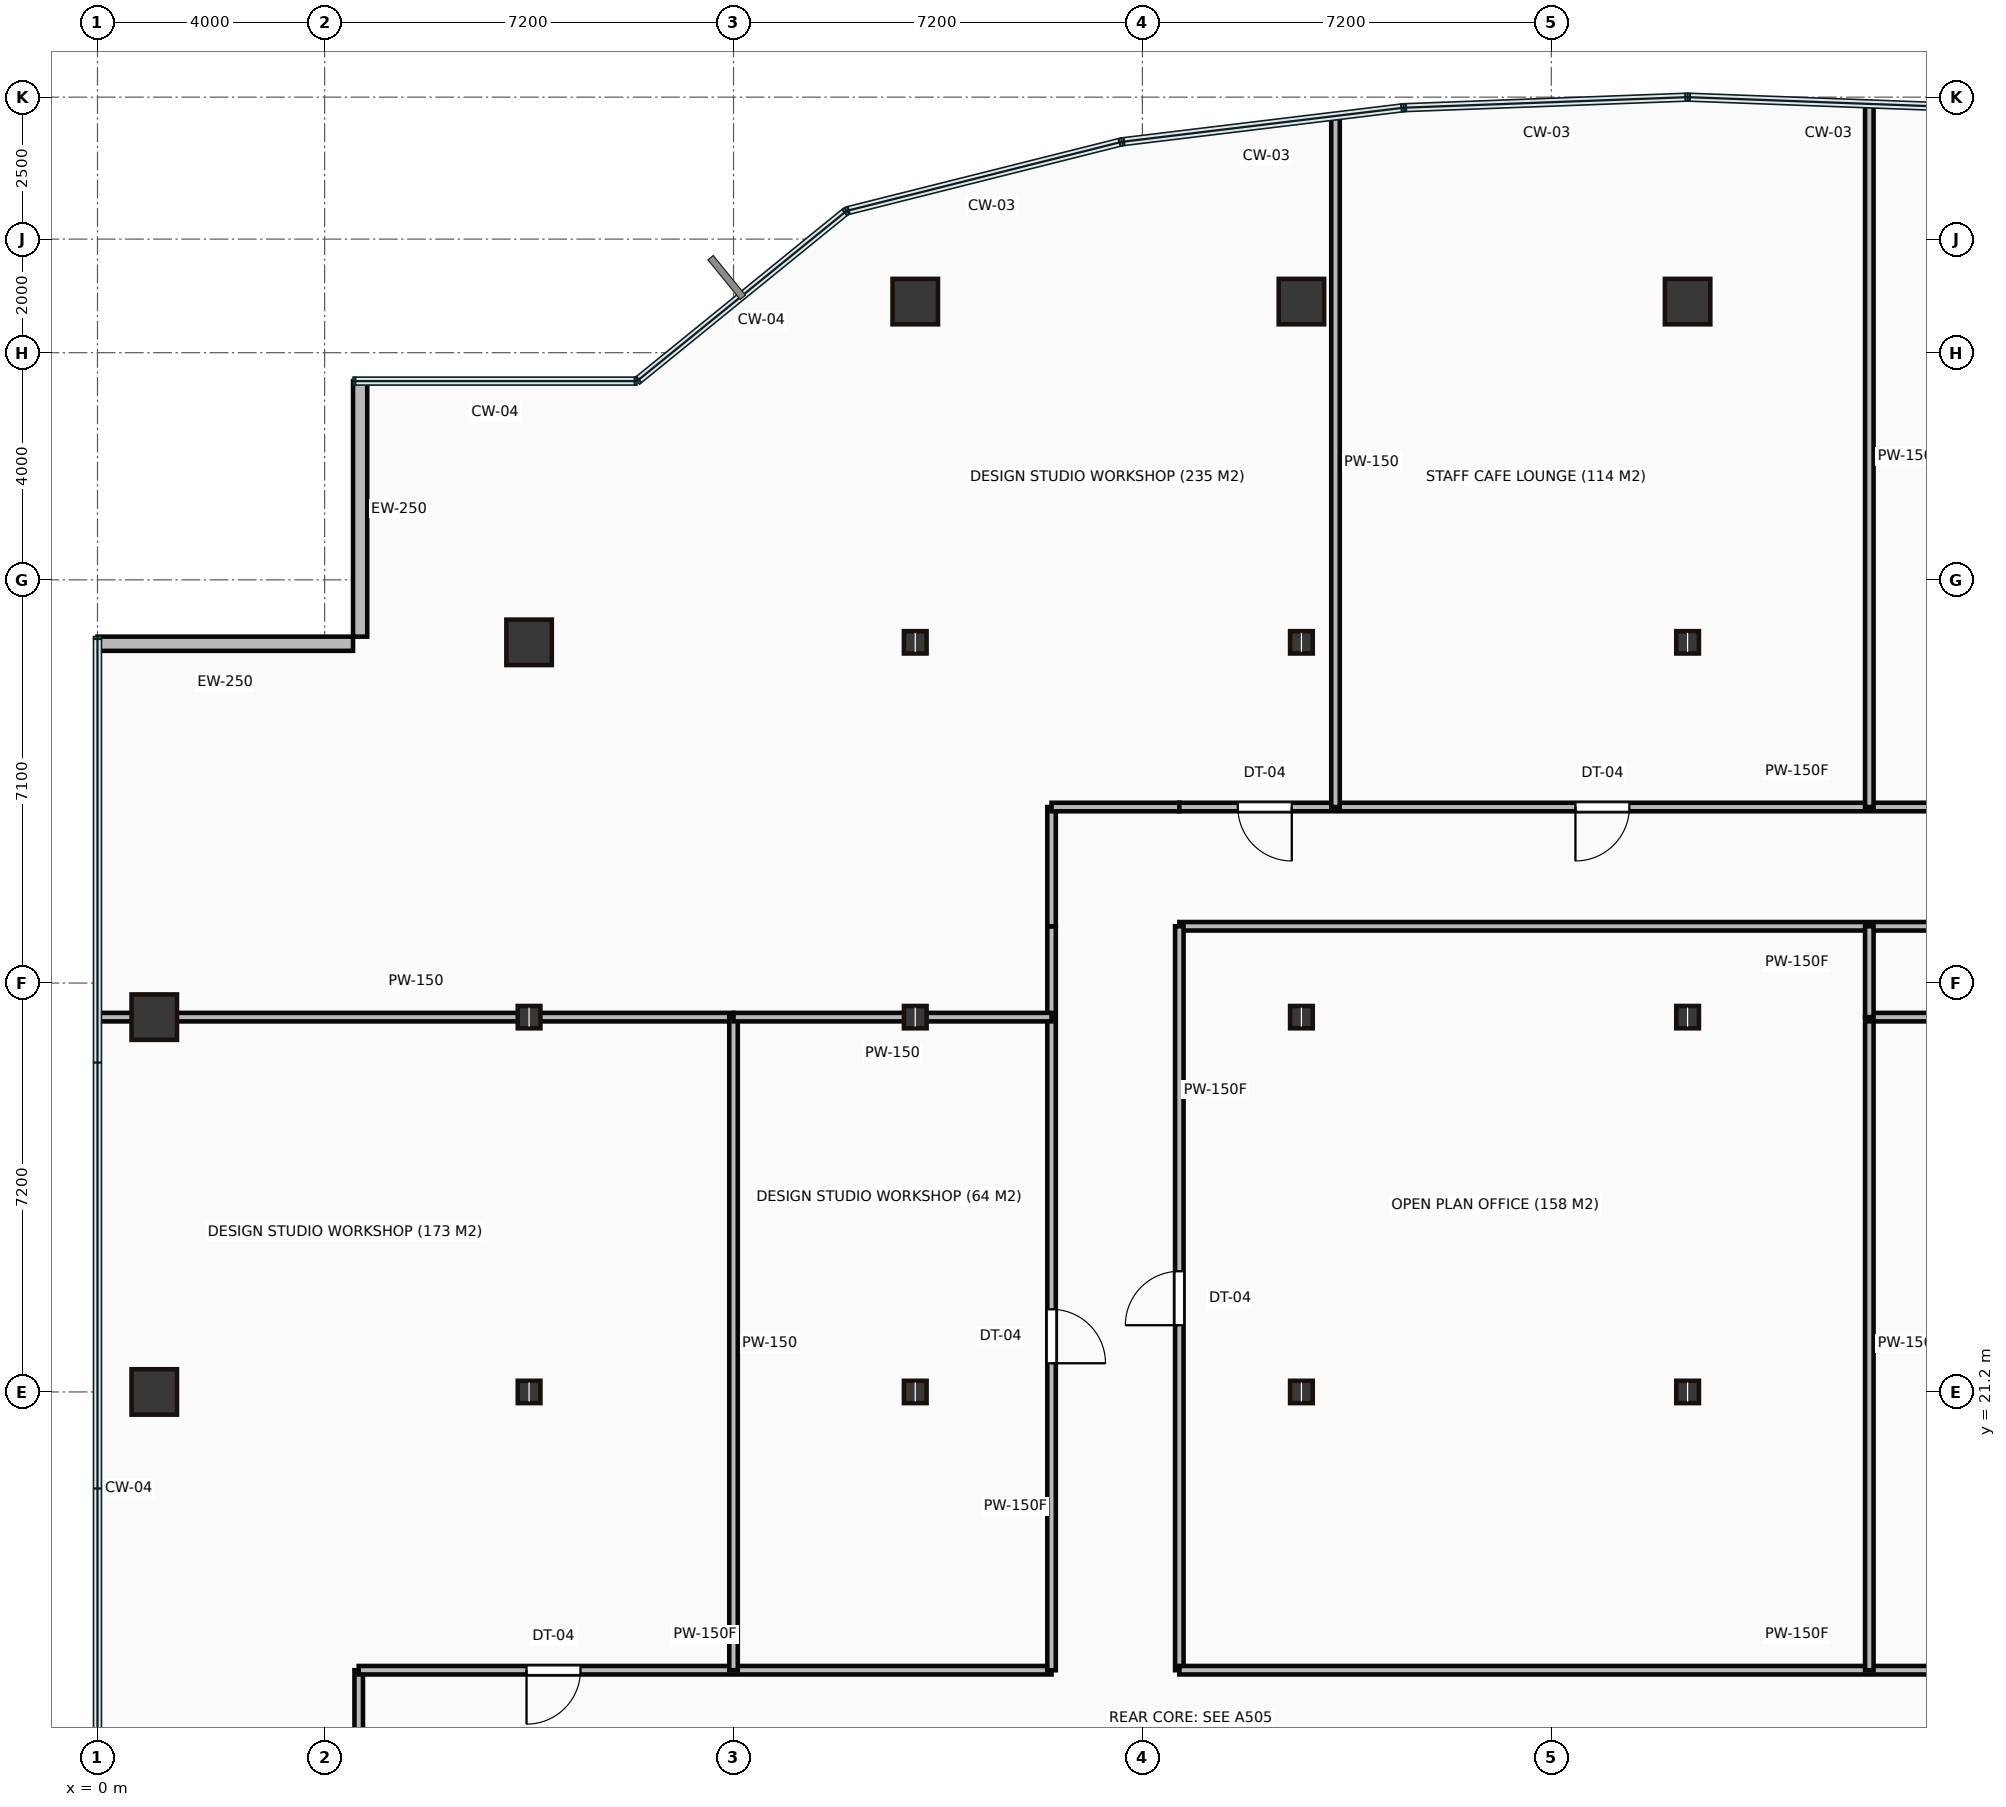
"""IFC4 building model, lengths in metres.
Left out: names, types, materials, properties, quantities, classifications, styles, units other than length and angle.
Written with IfcOpenShell. Run it as: python <this file> out.ifc"""

import sys

from ifc_helpers import new_model, si_unit, direction, frame, frame_2d, origin, origin_2d, place, context, subcontext, project, spatial, rectangle, hollow_rectangle, i_section, extrude, source, transform, mapped, element, fill, save


model = new_model("IFC4")
c1 = context("Model", 3, precision=1e-05, world=origin(), true_north=direction((0.0, 1.0)))
c2 = subcontext(c1, "Body", "Model", "MODEL_VIEW")
j1 = project(units=[si_unit("LENGTHUNIT", "METRE"), si_unit("PLANEANGLEUNIT", "RADIAN")], contexts=[c1])
p1 = place(None, origin())
s1 = spatial("IfcSite", under=j1, at=p1, CompositionType="ELEMENT")
p2 = place(p1, origin())
s2 = spatial("IfcBuilding", under=s1, at=p2, CompositionType="ELEMENT")
p3 = place(p2, frame((0.0, 0.0, 110.55)))
s3 = spatial("IfcBuildingStorey", under=s2, at=p3, CompositionType="ELEMENT", Elevation=110.55)
m1 = source(origin(), c2, "Body", "SweptSolid", [
    extrude(hollow_rectangle(XDim=0.8, YDim=0.8, WallThickness=0.04, at=origin_2d()), origin(), (0.0, 0.0, 1.0), 3.65),
])
for number, where, z_axis, x_axis in (
    (1, (1.0, 21.2, 0.0), (0.0, 0.0, 1.0), (1.0, 0.0, 0.0)),
    (2, (1.0, 27.8, 0.0), (0.0, 0.0, 1.0), (1.0, 0.0, 0.0)),
):
    element("IfcColumn", number, at=place(p3, frame(where, z_axis=z_axis, x_axis=x_axis)), inside=s3, PredefinedType="COLUMN", context=c2, shape_type="MappedRepresentation", body=[
        mapped(m1, transform((0.0, 0.0, 0.0))),
    ])
m2 = source(origin(), c2, "Body", "SweptSolid", [
    extrude(i_section(OverallWidth=0.399, OverallDepth=0.393, WebThickness=0.023, FlangeThickness=0.037, at=origin_2d()), origin(), (0.0, 0.0, 1.0), 3.65),
])
for number, where, z_axis, x_axis in (
    (3, (7.6, 21.2, 0.0), (0.0, 0.0, 1.0), (1.0, 0.0, 0.0)),
    (4, (7.6, 27.8, 0.0), (0.0, 0.0, 1.0), (1.0, 0.0, 0.0)),
):
    element("IfcColumn", number, at=place(p3, frame(where, z_axis=z_axis, x_axis=x_axis)), inside=s3, PredefinedType="COLUMN", context=c2, shape_type="MappedRepresentation", body=[
        mapped(m2, transform((0.0, 0.0, 0.0))),
    ])
p4 = place(p3, frame((7.6, 34.4, 0.0), z_axis=(0.0, 0.0, 1.0), x_axis=(1.0, 0.0, 0.0)))
e5 = element("IfcColumn", 5, at=p4, inside=s3, PredefinedType="COLUMN", context=c2, shape_type="MappedRepresentation", body=[
    mapped(m1, transform((0.0, 0.0, 0.0))),
])
for number, where, z_axis, x_axis in (
    (6, (14.4, 21.2, 0.0), (0.0, 0.0, 1.0), (1.0, 0.0, 0.0)),
    (7, (14.4, 27.8, 0.0), (0.0, 0.0, 1.0), (1.0, 0.0, 0.0)),
    (8, (14.4, 34.4, 0.0), (0.0, 0.0, 1.0), (1.0, 0.0, 0.0)),
):
    element("IfcColumn", number, at=place(p3, frame(where, z_axis=z_axis, x_axis=x_axis)), inside=s3, PredefinedType="COLUMN", context=c2, shape_type="MappedRepresentation", body=[
        mapped(m2, transform((0.0, 0.0, 0.0))),
    ])
p5 = place(p3, frame((14.4, 40.4, 0.0), z_axis=(0.0, 0.0, 1.0), x_axis=(1.0, 0.0, 0.0)))
e9 = element("IfcColumn", 9, at=p5, inside=s3, PredefinedType="COLUMN", context=c2, shape_type="MappedRepresentation", body=[
    mapped(m1, transform((0.0, 0.0, 0.0))),
])
for number, where, z_axis, x_axis in (
    (10, (21.2, 21.2, 0.0), (0.0, 0.0, 1.0), (1.0, 0.0, 0.0)),
    (11, (21.2, 27.8, 0.0), (0.0, 0.0, 1.0), (1.0, 0.0, 0.0)),
    (12, (21.2, 34.4, 0.0), (0.0, 0.0, 1.0), (1.0, 0.0, 0.0)),
):
    element("IfcColumn", number, at=place(p3, frame(where, z_axis=z_axis, x_axis=x_axis)), inside=s3, PredefinedType="COLUMN", context=c2, shape_type="MappedRepresentation", body=[
        mapped(m2, transform((0.0, 0.0, 0.0))),
    ])
p6 = place(p3, frame((21.2, 40.4, 0.0), z_axis=(0.0, 0.0, 1.0), x_axis=(1.0, 0.0, 0.0)))
e13 = element("IfcColumn", 13, at=p6, inside=s3, PredefinedType="COLUMN", context=c2, shape_type="MappedRepresentation", body=[
    mapped(m1, transform((0.0, 0.0, 0.0))),
])
for number, where, z_axis, x_axis in (
    (14, (28.0, 21.2, 0.0), (0.0, 0.0, 1.0), (1.0, 0.0, 0.0)),
    (15, (28.0, 27.8, 0.0), (0.0, 0.0, 1.0), (1.0, 0.0, 0.0)),
    (16, (28.0, 34.4, 0.0), (0.0, 0.0, 1.0), (1.0, 0.0, 0.0)),
):
    element("IfcColumn", number, at=place(p3, frame(where, z_axis=z_axis, x_axis=x_axis)), inside=s3, PredefinedType="COLUMN", context=c2, shape_type="MappedRepresentation", body=[
        mapped(m2, transform((0.0, 0.0, 0.0))),
    ])
p7 = place(p3, frame((28.0, 40.4, 0.0), z_axis=(0.0, 0.0, 1.0), x_axis=(1.0, 0.0, 0.0)))
e17 = element("IfcColumn", 17, at=p7, inside=s3, PredefinedType="COLUMN", context=c2, shape_type="MappedRepresentation", body=[
    mapped(m1, transform((0.0, 0.0, 0.0))),
])
m3 = source(origin(), c2, "Body", "SweptSolid", [
    extrude(rectangle(XDim=4.5, YDim=0.25, at=frame_2d((2.25, 0.0))), origin(), (0.0, 0.0, 1.0), 3.4),
])
for number, where, z_axis, x_axis in (
    (18, (4.625, 39.0, 0.0), (0.0, 0.0, 1.0), (0.0, -1.0, 0.0)),
    (19, (4.5, 34.375, 0.0), (0.0, 0.0, 1.0), (-1.0, 0.0, 0.0)),
):
    element("IfcWall", number, at=place(p3, frame(where, z_axis=z_axis, x_axis=x_axis)), inside=s3, PredefinedType="STANDARD", context=c2, shape_type="MappedRepresentation", body=[
        mapped(m3, transform((0.0, 0.0, 0.0))),
    ])
m4 = source(origin(), c2, "Body", "SweptSolid", [
    extrude(rectangle(XDim=2.22, YDim=0.15, at=frame_2d((1.11, 0.0))), origin(), (0.0, 0.0, 1.0), 3.4),
])
p8 = place(p3, frame((4.6, 14.08, 0.0), z_axis=(0.0, 0.0, 1.0), x_axis=(0.0, 1.0, 0.0)))
e20 = element("IfcWall", 20, at=p8, inside=s3, PredefinedType="PARTITIONING", context=c2, shape_type="MappedRepresentation", body=[
    mapped(m4, transform((0.0, 0.0, 0.0))),
])
m5 = source(origin(), c2, "Body", "SweptSolid", [
    extrude(rectangle(XDim=12.2, YDim=0.15, at=frame_2d((6.1, 0.0))), origin(), (0.0, 0.0, 1.0), 3.4),
])
p9 = place(p3, frame((4.6, 16.3, 0.0), z_axis=(0.0, 0.0, 1.0), x_axis=(1.0, 0.0, 0.0)))
e21 = element("IfcWall", 21, at=p9, inside=s3, PredefinedType="PARTITIONING", context=c2, shape_type="MappedRepresentation", body=[
    mapped(m5, transform((0.0, 0.0, 0.0))),
])
p10 = place(p9, frame((2.955, 0.0, 0.0)))
e22 = element("IfcOpeningElement", 22, at=p10, cuts=e21, PredefinedType="OPENING", context=c2, shape_type="SweptSolid", body=[
    extrude(rectangle(XDim=0.95, YDim=2.15, at=frame_2d((0.475, 1.075))), frame((0.0, 0.085, 0.0), z_axis=(0.0, -1.0, 0.0), x_axis=(1.0, 0.0, 0.0)), (0.0, 0.0, 1.0), 0.17),
])
m6 = source(origin(), c2, "Body", "SweptSolid", [
    extrude(rectangle(XDim=13.1, YDim=0.15, at=frame_2d((6.55, 0.0))), origin(), (0.0, 0.0, 1.0), 3.4),
])
p11 = place(p3, frame((16.8, 16.3, 0.0), z_axis=(0.0, 0.0, 1.0), x_axis=(0.0, 1.0, 0.0)))
e23 = element("IfcWall", 23, at=p11, inside=s3, PredefinedType="PARTITIONING", context=c2, shape_type="MappedRepresentation", body=[
    mapped(m6, transform((0.0, 0.0, 0.0))),
])
p12 = place(p11, frame((5.405, 0.0, 0.0)))
e24 = element("IfcOpeningElement", 24, at=p12, cuts=e23, PredefinedType="OPENING", context=c2, shape_type="SweptSolid", body=[
    extrude(rectangle(XDim=0.95, YDim=2.15, at=frame_2d((0.475, 1.075))), frame((0.0, 0.085, 0.0), z_axis=(0.0, -1.0, 0.0), x_axis=(1.0, 0.0, 0.0)), (0.0, 0.0, 1.0), 0.17),
])
m7 = source(origin(), c2, "Body", "SweptSolid", [
    extrude(rectangle(XDim=2.1, YDim=0.15, at=frame_2d((1.05, 0.0))), origin(), (0.0, 0.0, 1.0), 3.4),
])
p13 = place(p3, frame((16.8, 29.4, 0.0), z_axis=(0.0, 0.0, 1.0), x_axis=(0.0, 1.0, 0.0)))
e25 = element("IfcWall", 25, at=p13, inside=s3, PredefinedType="PARTITIONING", context=c2, shape_type="MappedRepresentation", body=[
    mapped(m7, transform((0.0, 0.0, 0.0))),
])
m8 = source(origin(), c2, "Body", "SweptSolid", [
    extrude(rectangle(XDim=2.25, YDim=0.15, at=frame_2d((1.125, 0.0))), origin(), (0.0, 0.0, 1.0), 3.4),
])
p14 = place(p3, frame((16.8, 31.5, 0.0), z_axis=(0.0, 0.0, 1.0), x_axis=(1.0, 0.0, 0.0)))
e26 = element("IfcWall", 26, at=p14, inside=s3, PredefinedType="PARTITIONING", context=c2, shape_type="MappedRepresentation", body=[
    mapped(m8, transform((0.0, 0.0, 0.0))),
])
m9 = source(origin(), c2, "Body", "SweptSolid", [
    extrude(rectangle(XDim=21.75, YDim=0.15, at=frame_2d((10.875, 0.0))), origin(), (0.0, 0.0, 1.0), 3.4),
])
p15 = place(p3, frame((19.05, 31.5, 0.0), z_axis=(0.0, 0.0, 1.0), x_axis=(1.0, 0.0, 0.0)))
e27 = element("IfcWall", 27, at=p15, inside=s3, PredefinedType="PARTITIONING", context=c2, shape_type="MappedRepresentation", body=[
    mapped(m9, transform((0.0, 0.0, 0.0))),
])
p16 = place(p15, frame((1.03, 0.0, 0.0)))
e28 = element("IfcOpeningElement", 28, at=p16, cuts=e27, PredefinedType="OPENING", context=c2, shape_type="SweptSolid", body=[
    extrude(rectangle(XDim=0.95, YDim=2.15, at=frame_2d((0.475, 1.075))), frame((0.0, 0.085, 0.0), z_axis=(0.0, -1.0, 0.0), x_axis=(1.0, 0.0, 0.0)), (0.0, 0.0, 1.0), 0.17),
])
p17 = place(p15, frame((6.975, 0.0, 0.0)))
e29 = element("IfcOpeningElement", 29, at=p17, cuts=e27, PredefinedType="OPENING", context=c2, shape_type="SweptSolid", body=[
    extrude(rectangle(XDim=0.95, YDim=2.15, at=frame_2d((0.475, 1.075))), frame((0.0, 0.085, 0.0), z_axis=(0.0, -1.0, 0.0), x_axis=(1.0, 0.0, 0.0)), (0.0, 0.0, 1.0), 0.17),
])
p18 = place(p15, frame((16.345, 0.0, 0.0)))
e30 = element("IfcOpeningElement", 30, at=p18, cuts=e27, PredefinedType="OPENING", context=c2, shape_type="SweptSolid", body=[
    extrude(rectangle(XDim=0.95, YDim=2.15, at=frame_2d((0.475, 1.075))), frame((0.0, 0.085, 0.0), z_axis=(0.0, -1.0, 0.0), x_axis=(1.0, 0.0, 0.0)), (0.0, 0.0, 1.0), 0.17),
])
p19 = place(p3, frame((40.8, 29.4, 0.0), z_axis=(0.0, 0.0, 1.0), x_axis=(-1.0, 0.0, 0.0)))
e31 = element("IfcWall", 31, at=p19, inside=s3, PredefinedType="PARTITIONING", context=c2, shape_type="MappedRepresentation", body=[
    mapped(m9, transform((0.0, 0.0, 0.0))),
])
p20 = place(p3, frame((19.05, 29.4, 0.0), z_axis=(0.0, 0.0, 1.0), x_axis=(0.0, -1.0, 0.0)))
e32 = element("IfcWall", 32, at=p20, inside=s3, PredefinedType="PARTITIONING", context=c2, shape_type="MappedRepresentation", body=[
    mapped(m6, transform((0.0, 0.0, 0.0))),
])
p21 = place(p20, frame((6.075, 0.0, 0.0)))
e33 = element("IfcOpeningElement", 33, at=p21, cuts=e32, PredefinedType="OPENING", context=c2, shape_type="SweptSolid", body=[
    extrude(rectangle(XDim=0.95, YDim=2.15, at=frame_2d((0.475, 1.075))), frame((0.0, 0.085, 0.0), z_axis=(0.0, -1.0, 0.0), x_axis=(1.0, 0.0, 0.0)), (0.0, 0.0, 1.0), 0.17),
])
p22 = place(p3, frame((19.05, 16.3, 0.0), z_axis=(0.0, 0.0, 1.0), x_axis=(1.0, 0.0, 0.0)))
e34 = element("IfcWall", 34, at=p22, inside=s3, PredefinedType="PARTITIONING", context=c2, shape_type="MappedRepresentation", body=[
    mapped(m9, transform((0.0, 0.0, 0.0))),
])
p23 = place(p22, frame((16.345, 0.0, 0.0)))
e35 = element("IfcOpeningElement", 35, at=p23, cuts=e34, PredefinedType="OPENING", context=c2, shape_type="SweptSolid", body=[
    extrude(rectangle(XDim=0.95, YDim=2.15, at=frame_2d((0.475, 1.075))), frame((0.0, 0.085, 0.0), z_axis=(0.0, -1.0, 0.0), x_axis=(1.0, 0.0, 0.0)), (0.0, 0.0, 1.0), 0.17),
])
m10 = source(origin(), c2, "Body", "SweptSolid", [
    extrude(rectangle(XDim=11.18, YDim=0.15, at=frame_2d((5.59, 0.0))), origin(), (0.0, 0.0, 1.0), 2.702),
])
p24 = place(p3, frame((0.02, 27.8, 0.0), z_axis=(0.0, 0.0, 1.0), x_axis=(1.0, 0.0, 0.0)))
e36 = element("IfcWall", 36, at=p24, inside=s3, PredefinedType="PARTITIONING", context=c2, shape_type="MappedRepresentation", body=[
    mapped(m10, transform((0.0, 0.0, 0.0))),
])
m11 = source(origin(), c2, "Body", "SweptSolid", [
    extrude(rectangle(XDim=11.5, YDim=0.15, at=frame_2d((5.75, 0.0))), origin(), (0.0, 0.0, 1.0), 3.4),
])
p25 = place(p3, frame((11.2, 27.8, 0.0), z_axis=(0.0, 0.0, 1.0), x_axis=(0.0, -1.0, 0.0)))
e37 = element("IfcWall", 37, at=p25, inside=s3, PredefinedType="PARTITIONING", context=c2, shape_type="MappedRepresentation", body=[
    mapped(m11, transform((0.0, 0.0, 0.0))),
])
m12 = source(origin(), c2, "Body", "SweptSolid", [
    extrude(rectangle(XDim=5.6, YDim=0.15, at=frame_2d((2.8, 0.0))), origin(), (0.0, 0.0, 1.0), 2.702),
])
p26 = place(p3, frame((16.8, 27.8, 0.0), z_axis=(0.0, 0.0, 1.0), x_axis=(-1.0, 0.0, 0.0)))
e38 = element("IfcWall", 38, at=p26, inside=s3, PredefinedType="PARTITIONING", context=c2, shape_type="MappedRepresentation", body=[
    mapped(m12, transform((0.0, 0.0, 0.0))),
])
m13 = source(origin(), c2, "Body", "SweptSolid", [
    extrude(rectangle(XDim=12.148, YDim=0.15, at=frame_2d((6.074, 0.0))), origin(), (0.0, 0.0, 1.0), 3.4),
])
p27 = place(p3, frame((21.8, 43.648, 0.0), z_axis=(0.0, 0.0, 1.0), x_axis=(0.0, -1.0, 0.0)))
e39 = element("IfcWall", 39, at=p27, inside=s3, PredefinedType="PARTITIONING", context=c2, shape_type="MappedRepresentation", body=[
    mapped(m13, transform((0.0, 0.0, 0.0))),
])
p28 = place(p3, frame((31.2, 27.8, 0.0), z_axis=(0.0, 0.0, 1.0), x_axis=(0.0, -1.0, 0.0)))
e40 = element("IfcWall", 40, at=p28, inside=s3, PredefinedType="PARTITIONING", context=c2, shape_type="MappedRepresentation", body=[
    mapped(m11, transform((0.0, 0.0, 0.0))),
])
m14 = source(origin(), c2, "Body", "SweptSolid", [
    extrude(rectangle(XDim=10.3, YDim=0.15, at=frame_2d((5.15, 0.0))), origin(), (0.0, 0.0, 1.0), 2.702),
])
p29 = place(p3, frame((41.5, 27.8, 0.0), z_axis=(0.0, 0.0, 1.0), x_axis=(-1.0, 0.0, 0.0)))
e41 = element("IfcWall", 41, at=p29, inside=s3, PredefinedType="PARTITIONING", context=c2, shape_type="MappedRepresentation", body=[
    mapped(m14, transform((0.0, 0.0, 0.0))),
])
m15 = source(origin(), c2, "Body", "SweptSolid", [
    extrude(rectangle(XDim=1.6, YDim=0.15, at=frame_2d((0.8, 0.0))), origin(), (0.0, 0.0, 1.0), 3.4),
])
p30 = place(p3, frame((31.2, 29.4, 0.0), z_axis=(0.0, 0.0, 1.0), x_axis=(0.0, -1.0, 0.0)))
e42 = element("IfcWall", 42, at=p30, inside=s3, PredefinedType="PARTITIONING", context=c2, shape_type="MappedRepresentation", body=[
    mapped(m15, transform((0.0, 0.0, 0.0))),
])
m16 = source(origin(), c2, "Body", "SweptSolid", [
    extrude(rectangle(XDim=12.361, YDim=0.15, at=frame_2d((6.18, 0.0))), origin(), (0.0, 0.0, 1.0), 3.4),
])
p31 = place(p3, frame((31.2, 43.861, 0.0), z_axis=(0.0, 0.0, 1.0), x_axis=(0.0, -1.0, 0.0)))
e43 = element("IfcWall", 43, at=p31, inside=s3, PredefinedType="PARTITIONING", context=c2, shape_type="MappedRepresentation", body=[
    mapped(m16, transform((0.0, 0.0, 0.0))),
])
m17 = source(origin(), c2, "Body", "SweptSolid", [
    extrude(rectangle(XDim=0.95, YDim=2.15, at=frame_2d((0.475, 1.075))), frame((0.0, 0.025, 0.0), z_axis=(0.0, -1.0, 0.0), x_axis=(1.0, 0.0, 0.0)), (0.0, 0.0, 1.0), 0.05),
])
p32 = place(p10, origin())
e44 = element("IfcDoor", 44, at=p32, inside=s3, OperationType="SINGLE_SWING_LEFT", PredefinedType="DOOR", context=c2, shape_type="MappedRepresentation", body=[
    mapped(m17, transform((0.0, 0.0, 0.0))),
])
fill(e22, e44)
p33 = place(p16, origin())
e45 = element("IfcDoor", 45, at=p33, inside=s3, OperationType="SINGLE_SWING_RIGHT", PredefinedType="DOOR", context=c2, shape_type="MappedRepresentation", body=[
    mapped(m17, transform((0.0, 0.0, 0.0))),
])
fill(e28, e45)
p34 = place(p12, origin())
e46 = element("IfcDoor", 46, at=p34, inside=s3, OperationType="SINGLE_SWING_LEFT", PredefinedType="DOOR", context=c2, shape_type="MappedRepresentation", body=[
    mapped(m17, transform((0.0, 0.0, 0.0))),
])
fill(e24, e46)
p35 = place(p21, origin())
e47 = element("IfcDoor", 47, at=p35, inside=s3, OperationType="SINGLE_SWING_RIGHT", PredefinedType="DOOR", context=c2, shape_type="MappedRepresentation", body=[
    mapped(m17, transform((0.0, 0.0, 0.0))),
])
fill(e33, e47)
p36 = place(p17, origin())
e48 = element("IfcDoor", 48, at=p36, inside=s3, OperationType="SINGLE_SWING_LEFT", PredefinedType="DOOR", context=c2, shape_type="MappedRepresentation", body=[
    mapped(m17, transform((0.0, 0.0, 0.0))),
])
fill(e29, e48)
save(model, sys.argv[1])
